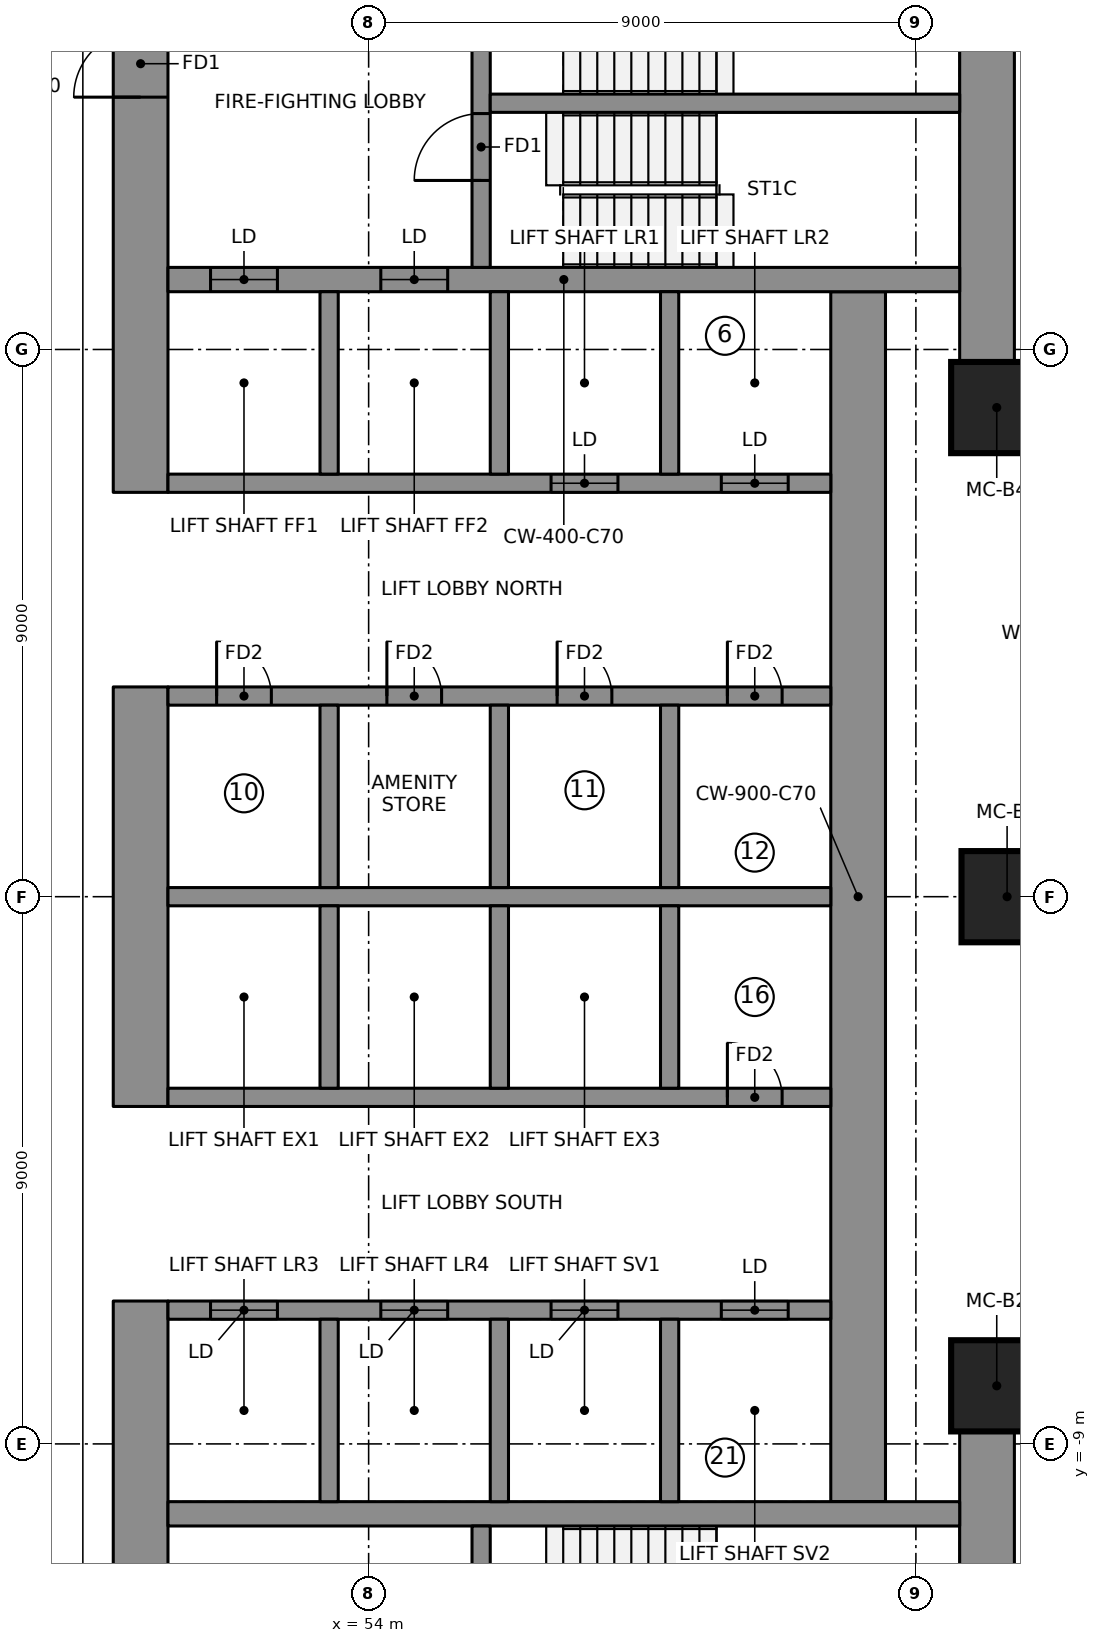
"""IFC4 building model, lengths in metres.
Left out: names, types, materials, properties, quantities, classifications, styles, units other than length and angle.
Written with IfcOpenShell. Run it as: python <this file> out.ifc"""

import sys

from ifc_helpers import new_model, si_unit, direction, frame, frame_2d, origin, origin_2d, place, context, subcontext, project, spatial, rectangle, extrude, element, fill, save


model = new_model("IFC4")
c1 = context("Model", 3, precision=1e-05, world=origin(), true_north=direction((0.0, 1.0)))
c2 = subcontext(c1, "Body", "Model", "MODEL_VIEW")
j1 = project(units=[si_unit("LENGTHUNIT", "METRE"), si_unit("PLANEANGLEUNIT", "RADIAN")], contexts=[c1])
p1 = place(None, origin())
s1 = spatial("IfcSite", under=j1, at=p1, CompositionType="ELEMENT")
p2 = place(p1, origin())
s2 = spatial("IfcBuilding", under=s1, at=p2, CompositionType="ELEMENT")
p3 = place(p2, frame((0.0, 0.0, 158.6)))
s3 = spatial("IfcBuildingStorey", under=s2, at=p3, CompositionType="ELEMENT", Elevation=158.6)
p4 = place(p3, frame((50.25, 6.65, 0.0), z_axis=(0.0, 0.0, 1.0), x_axis=(0.0, 1.0, 0.0)))
e1 = element("IfcWall", 1, at=p4, inside=s3, PredefinedType="SHEAR", context=c2, shape_type="SweptSolid", body=[
    extrude(rectangle(XDim=10.0, YDim=0.9, at=frame_2d((5.0, 0.0))), origin(), (0.0, 0.0, 1.0), 3.55),
])
p5 = place(p4, frame((6.5, 0.0, 0.0)))
e2 = element("IfcOpeningElement", 2, at=p5, cuts=e1, PredefinedType="OPENING", context=c2, shape_type="SweptSolid", body=[
    extrude(rectangle(XDim=1.1, YDim=2.1, at=frame_2d((0.55, 1.05))), frame((0.0, 0.46, 0.0), z_axis=(0.0, -1.0, 0.0), x_axis=(1.0, 0.0, 0.0)), (0.0, 0.0, 1.0), 0.92),
])
p6 = place(p3, frame((50.25, -3.45, 0.0), z_axis=(0.0, 0.0, 1.0), x_axis=(0.0, 1.0, 0.0)))
e3 = element("IfcWall", 3, at=p6, inside=s3, PredefinedType="SHEAR", context=c2, shape_type="SweptSolid", body=[
    extrude(rectangle(XDim=6.9, YDim=0.9, at=frame_2d((3.45, 0.0))), origin(), (0.0, 0.0, 1.0), 3.55),
])
p7 = place(p3, frame((50.25, -16.65, 0.0), z_axis=(0.0, 0.0, 1.0), x_axis=(0.0, 1.0, 0.0)))
e4 = element("IfcWall", 4, at=p7, inside=s3, PredefinedType="SHEAR", context=c2, shape_type="SweptSolid", body=[
    extrude(rectangle(XDim=10.0, YDim=0.9, at=frame_2d((5.0, 0.0))), origin(), (0.0, 0.0, 1.0), 3.55),
])
p8 = place(p7, frame((2.4, 0.0, 0.0)))
e5 = element("IfcOpeningElement", 5, at=p8, cuts=e4, PredefinedType="OPENING", context=c2, shape_type="SweptSolid", body=[
    extrude(rectangle(XDim=1.1, YDim=2.1, at=frame_2d((0.55, 1.05))), frame((0.0, 0.46, 0.0), z_axis=(0.0, -1.0, 0.0), x_axis=(1.0, 0.0, 0.0)), (0.0, 0.0, 1.0), 0.92),
])
for number, where, z_axis, x_axis in (
    (6, (64.17, 8.745, 0.0), (0.0, 0.0, 1.0), (0.0, 1.0, 0.0)),
    (7, (64.17, -15.75, 0.0), (0.0, 0.0, 1.0), (0.0, 1.0, 0.0)),
):
    element("IfcWall", number, at=place(p3, frame(where, z_axis=z_axis, x_axis=x_axis)), inside=s3, PredefinedType="SHEAR", context=c2, shape_type="SweptSolid", body=[
        extrude(rectangle(XDim=7.005, YDim=0.9, at=frame_2d((3.503, 0.0))), origin(), (0.0, 0.0, 1.0), 3.55),
    ])
p9 = place(p3, frame((62.05, -9.95, 0.0), z_axis=(0.0, 0.0, 1.0), x_axis=(0.0, 1.0, 0.0)))
e8 = element("IfcWall", 8, at=p9, inside=s3, PredefinedType="SHEAR", context=c2, shape_type="SweptSolid", body=[
    extrude(rectangle(XDim=19.9, YDim=0.9, at=frame_2d((9.95, 0.0))), origin(), (0.0, 0.0, 1.0), 3.55),
])
p10 = place(p3, frame((50.7, 10.15, 0.0), z_axis=(0.0, 0.0, 1.0), x_axis=(1.0, 0.0, 0.0)))
e9 = element("IfcWall", 9, at=p10, inside=s3, PredefinedType="SHEAR", context=c2, shape_type="SweptSolid", body=[
    extrude(rectangle(XDim=13.02, YDim=0.4, at=frame_2d((6.51, 0.0))), origin(), (0.0, 0.0, 1.0), 3.55),
])
p11 = place(p10, frame((0.7, 0.0, 0.0)))
e10 = element("IfcOpeningElement", 10, at=p11, cuts=e9, PredefinedType="OPENING", context=c2, shape_type="SweptSolid", body=[
    extrude(rectangle(XDim=1.1, YDim=2.1, at=frame_2d((0.55, 1.05))), frame((0.0, 0.21, 0.0), z_axis=(0.0, -1.0, 0.0), x_axis=(1.0, 0.0, 0.0)), (0.0, 0.0, 1.0), 0.42),
])
p12 = place(p10, frame((3.5, 0.0, 0.0)))
e11 = element("IfcOpeningElement", 11, at=p12, cuts=e9, PredefinedType="OPENING", context=c2, shape_type="SweptSolid", body=[
    extrude(rectangle(XDim=1.1, YDim=2.1, at=frame_2d((0.55, 1.05))), frame((0.0, 0.21, 0.0), z_axis=(0.0, -1.0, 0.0), x_axis=(1.0, 0.0, 0.0)), (0.0, 0.0, 1.0), 0.42),
])
p13 = place(p3, frame((50.7, -10.15, 0.0), z_axis=(0.0, 0.0, 1.0), x_axis=(1.0, 0.0, 0.0)))
e12 = element("IfcWall", 12, at=p13, inside=s3, PredefinedType="SHEAR", context=c2, shape_type="SweptSolid", body=[
    extrude(rectangle(XDim=13.02, YDim=0.4, at=frame_2d((6.51, 0.0))), origin(), (0.0, 0.0, 1.0), 3.55),
])
p14 = place(p3, frame((50.7, 0.0, 0.0), z_axis=(0.0, 0.0, 1.0), x_axis=(1.0, 0.0, 0.0)))
e13 = element("IfcWall", 13, at=p14, inside=s3, PredefinedType="SHEAR", context=c2, shape_type="SweptSolid", body=[
    extrude(rectangle(XDim=10.9, YDim=0.3, at=frame_2d((5.45, 0.0))), origin(), (0.0, 0.0, 1.0), 3.55),
])
p15 = place(p3, frame((50.7, 3.3, 0.0), z_axis=(0.0, 0.0, 1.0), x_axis=(1.0, 0.0, 0.0)))
e14 = element("IfcWall", 14, at=p15, inside=s3, PredefinedType="SHEAR", context=c2, shape_type="SweptSolid", body=[
    extrude(rectangle(XDim=10.9, YDim=0.3, at=frame_2d((5.45, 0.0))), origin(), (0.0, 0.0, 1.0), 3.55),
])
p16 = place(p15, frame((0.8, 0.0, 0.0)))
e15 = element("IfcOpeningElement", 15, at=p16, cuts=e14, PredefinedType="OPENING", context=c2, shape_type="SweptSolid", body=[
    extrude(rectangle(XDim=0.9, YDim=2.1, at=frame_2d((0.45, 1.05))), frame((0.0, 0.16, 0.0), z_axis=(0.0, -1.0, 0.0), x_axis=(1.0, 0.0, 0.0)), (0.0, 0.0, 1.0), 0.32),
])
p17 = place(p15, frame((3.6, 0.0, 0.0)))
e16 = element("IfcOpeningElement", 16, at=p17, cuts=e14, PredefinedType="OPENING", context=c2, shape_type="SweptSolid", body=[
    extrude(rectangle(XDim=0.9, YDim=2.1, at=frame_2d((0.45, 1.05))), frame((0.0, 0.16, 0.0), z_axis=(0.0, -1.0, 0.0), x_axis=(1.0, 0.0, 0.0)), (0.0, 0.0, 1.0), 0.32),
])
p18 = place(p15, frame((6.4, 0.0, 0.0)))
e17 = element("IfcOpeningElement", 17, at=p18, cuts=e14, PredefinedType="OPENING", context=c2, shape_type="SweptSolid", body=[
    extrude(rectangle(XDim=0.9, YDim=2.1, at=frame_2d((0.45, 1.05))), frame((0.0, 0.16, 0.0), z_axis=(0.0, -1.0, 0.0), x_axis=(1.0, 0.0, 0.0)), (0.0, 0.0, 1.0), 0.32),
])
p19 = place(p15, frame((9.2, 0.0, 0.0)))
e18 = element("IfcOpeningElement", 18, at=p19, cuts=e14, PredefinedType="OPENING", context=c2, shape_type="SweptSolid", body=[
    extrude(rectangle(XDim=0.9, YDim=2.1, at=frame_2d((0.45, 1.05))), frame((0.0, 0.16, 0.0), z_axis=(0.0, -1.0, 0.0), x_axis=(1.0, 0.0, 0.0)), (0.0, 0.0, 1.0), 0.32),
])
p20 = place(p3, frame((50.7, 6.8, 0.0), z_axis=(0.0, 0.0, 1.0), x_axis=(1.0, 0.0, 0.0)))
e19 = element("IfcWall", 19, at=p20, inside=s3, PredefinedType="SHEAR", context=c2, shape_type="SweptSolid", body=[
    extrude(rectangle(XDim=10.9, YDim=0.3, at=frame_2d((5.45, 0.0))), origin(), (0.0, 0.0, 1.0), 3.55),
])
p21 = place(p20, frame((6.3, 0.0, 0.0)))
e20 = element("IfcOpeningElement", 20, at=p21, cuts=e19, PredefinedType="OPENING", context=c2, shape_type="SweptSolid", body=[
    extrude(rectangle(XDim=1.1, YDim=2.1, at=frame_2d((0.55, 1.05))), frame((0.0, 0.16, 0.0), z_axis=(0.0, -1.0, 0.0), x_axis=(1.0, 0.0, 0.0)), (0.0, 0.0, 1.0), 0.32),
])
p22 = place(p20, frame((9.1, 0.0, 0.0)))
e21 = element("IfcOpeningElement", 21, at=p22, cuts=e19, PredefinedType="OPENING", context=c2, shape_type="SweptSolid", body=[
    extrude(rectangle(XDim=1.1, YDim=2.1, at=frame_2d((0.55, 1.05))), frame((0.0, 0.16, 0.0), z_axis=(0.0, -1.0, 0.0), x_axis=(1.0, 0.0, 0.0)), (0.0, 0.0, 1.0), 0.32),
])
for number, where, z_axis, x_axis in (
    (22, (53.35, 0.15, 0.0), (0.0, 0.0, 1.0), (0.0, 1.0, 0.0)),
    (23, (53.35, 6.95, 0.0), (0.0, 0.0, 1.0), (0.0, 1.0, 0.0)),
    (24, (56.15, 0.15, 0.0), (0.0, 0.0, 1.0), (0.0, 1.0, 0.0)),
    (25, (56.15, 6.95, 0.0), (0.0, 0.0, 1.0), (0.0, 1.0, 0.0)),
    (26, (58.95, 0.15, 0.0), (0.0, 0.0, 1.0), (0.0, 1.0, 0.0)),
    (27, (58.95, 6.95, 0.0), (0.0, 0.0, 1.0), (0.0, 1.0, 0.0)),
):
    element("IfcWall", number, at=place(p3, frame(where, z_axis=z_axis, x_axis=x_axis)), inside=s3, PredefinedType="SHEAR", context=c2, shape_type="SweptSolid", body=[
        extrude(rectangle(XDim=3.0, YDim=0.3, at=frame_2d((1.5, 0.0))), origin(), (0.0, 0.0, 1.0), 3.55),
    ])
p23 = place(p3, frame((50.7, -3.3, 0.0), z_axis=(0.0, 0.0, 1.0), x_axis=(1.0, 0.0, 0.0)))
e28 = element("IfcWall", 28, at=p23, inside=s3, PredefinedType="SHEAR", context=c2, shape_type="SweptSolid", body=[
    extrude(rectangle(XDim=10.9, YDim=0.3, at=frame_2d((5.45, 0.0))), origin(), (0.0, 0.0, 1.0), 3.55),
])
p24 = place(p23, frame((9.2, 0.0, 0.0)))
e29 = element("IfcOpeningElement", 29, at=p24, cuts=e28, PredefinedType="OPENING", context=c2, shape_type="SweptSolid", body=[
    extrude(rectangle(XDim=0.9, YDim=2.1, at=frame_2d((0.45, 1.05))), frame((0.0, 0.16, 0.0), z_axis=(0.0, -1.0, 0.0), x_axis=(1.0, 0.0, 0.0)), (0.0, 0.0, 1.0), 0.32),
])
p25 = place(p3, frame((50.7, -6.8, 0.0), z_axis=(0.0, 0.0, 1.0), x_axis=(1.0, 0.0, 0.0)))
e30 = element("IfcWall", 30, at=p25, inside=s3, PredefinedType="SHEAR", context=c2, shape_type="SweptSolid", body=[
    extrude(rectangle(XDim=10.9, YDim=0.3, at=frame_2d((5.45, 0.0))), origin(), (0.0, 0.0, 1.0), 3.55),
])
p26 = place(p25, frame((0.7, 0.0, 0.0)))
e31 = element("IfcOpeningElement", 31, at=p26, cuts=e30, PredefinedType="OPENING", context=c2, shape_type="SweptSolid", body=[
    extrude(rectangle(XDim=1.1, YDim=2.1, at=frame_2d((0.55, 1.05))), frame((0.0, 0.16, 0.0), z_axis=(0.0, -1.0, 0.0), x_axis=(1.0, 0.0, 0.0)), (0.0, 0.0, 1.0), 0.32),
])
p27 = place(p25, frame((3.5, 0.0, 0.0)))
e32 = element("IfcOpeningElement", 32, at=p27, cuts=e30, PredefinedType="OPENING", context=c2, shape_type="SweptSolid", body=[
    extrude(rectangle(XDim=1.1, YDim=2.1, at=frame_2d((0.55, 1.05))), frame((0.0, 0.16, 0.0), z_axis=(0.0, -1.0, 0.0), x_axis=(1.0, 0.0, 0.0)), (0.0, 0.0, 1.0), 0.32),
])
p28 = place(p25, frame((6.3, 0.0, 0.0)))
e33 = element("IfcOpeningElement", 33, at=p28, cuts=e30, PredefinedType="OPENING", context=c2, shape_type="SweptSolid", body=[
    extrude(rectangle(XDim=1.1, YDim=2.1, at=frame_2d((0.55, 1.05))), frame((0.0, 0.16, 0.0), z_axis=(0.0, -1.0, 0.0), x_axis=(1.0, 0.0, 0.0)), (0.0, 0.0, 1.0), 0.32),
])
p29 = place(p25, frame((9.1, 0.0, 0.0)))
e34 = element("IfcOpeningElement", 34, at=p29, cuts=e30, PredefinedType="OPENING", context=c2, shape_type="SweptSolid", body=[
    extrude(rectangle(XDim=1.1, YDim=2.1, at=frame_2d((0.55, 1.05))), frame((0.0, 0.16, 0.0), z_axis=(0.0, -1.0, 0.0), x_axis=(1.0, 0.0, 0.0)), (0.0, 0.0, 1.0), 0.32),
])
for number, where, z_axis, x_axis in (
    (35, (53.35, -3.15, 0.0), (0.0, 0.0, 1.0), (0.0, 1.0, 0.0)),
    (36, (53.35, -9.95, 0.0), (0.0, 0.0, 1.0), (0.0, 1.0, 0.0)),
    (37, (56.15, -3.15, 0.0), (0.0, 0.0, 1.0), (0.0, 1.0, 0.0)),
    (38, (56.15, -9.95, 0.0), (0.0, 0.0, 1.0), (0.0, 1.0, 0.0)),
    (39, (58.95, -3.15, 0.0), (0.0, 0.0, 1.0), (0.0, 1.0, 0.0)),
    (40, (58.95, -9.95, 0.0), (0.0, 0.0, 1.0), (0.0, 1.0, 0.0)),
):
    element("IfcWall", number, at=place(p3, frame(where, z_axis=z_axis, x_axis=x_axis)), inside=s3, PredefinedType="SHEAR", context=c2, shape_type="SweptSolid", body=[
        extrude(rectangle(XDim=3.0, YDim=0.3, at=frame_2d((1.5, 0.0))), origin(), (0.0, 0.0, 1.0), 3.55),
    ])
p30 = place(p3, frame((55.85, 10.35, 0.0), z_axis=(0.0, 0.0, 1.0), x_axis=(0.0, 1.0, 0.0)))
e41 = element("IfcWall", 41, at=p30, inside=s3, PredefinedType="SHEAR", context=c2, shape_type="SweptSolid", body=[
    extrude(rectangle(XDim=5.4, YDim=0.3, at=frame_2d((2.7, 0.0))), origin(), (0.0, 0.0, 1.0), 3.55),
])
p31 = place(p30, frame((1.43, 0.0, 0.0)))
e42 = element("IfcOpeningElement", 42, at=p31, cuts=e41, PredefinedType="OPENING", context=c2, shape_type="SweptSolid", body=[
    extrude(rectangle(XDim=1.1, YDim=2.1, at=frame_2d((0.55, 1.05))), frame((0.0, 0.16, 0.0), z_axis=(0.0, -1.0, 0.0), x_axis=(1.0, 0.0, 0.0)), (0.0, 0.0, 1.0), 0.32),
])
p32 = place(p30, frame((3.6, 0.0, 0.0)))
e43 = element("IfcOpeningElement", 43, at=p32, cuts=e41, PredefinedType="OPENING", context=c2, shape_type="SweptSolid", body=[
    extrude(rectangle(XDim=1.1, YDim=2.1, at=frame_2d((0.55, 1.05))), frame((0.0, 0.16, 0.0), z_axis=(0.0, -1.0, 0.0), x_axis=(1.0, 0.0, 0.0)), (0.0, 0.0, 1.0), 0.32),
])
p33 = place(p3, frame((55.85, -15.75, 0.0), z_axis=(0.0, 0.0, 1.0), x_axis=(0.0, 1.0, 0.0)))
e44 = element("IfcWall", 44, at=p33, inside=s3, PredefinedType="SHEAR", context=c2, shape_type="SweptSolid", body=[
    extrude(rectangle(XDim=5.4, YDim=0.3, at=frame_2d((2.7, 0.0))), origin(), (0.0, 0.0, 1.0), 3.55),
])
p34 = place(p33, frame((3.6, 0.0, 0.0)))
e45 = element("IfcOpeningElement", 45, at=p34, cuts=e44, PredefinedType="OPENING", context=c2, shape_type="SweptSolid", body=[
    extrude(rectangle(XDim=1.1, YDim=2.1, at=frame_2d((0.55, 1.05))), frame((0.0, 0.16, 0.0), z_axis=(0.0, -1.0, 0.0), x_axis=(1.0, 0.0, 0.0)), (0.0, 0.0, 1.0), 0.32),
])
p35 = place(p33, frame((0.8, 0.0, 0.0)))
e46 = element("IfcOpeningElement", 46, at=p35, cuts=e44, PredefinedType="OPENING", context=c2, shape_type="SweptSolid", body=[
    extrude(rectangle(XDim=0.9, YDim=2.1, at=frame_2d((0.45, 1.05))), frame((0.0, 0.16, 0.0), z_axis=(0.0, -1.0, 0.0), x_axis=(1.0, 0.0, 0.0)), (0.0, 0.0, 1.0), 0.32),
])
p36 = place(p3, frame((56.0, 13.05, 0.0), z_axis=(0.0, 0.0, 1.0), x_axis=(1.0, 0.0, 0.0)))
e47 = element("IfcWall", 47, at=p36, inside=s3, PredefinedType="SHEAR", context=c2, shape_type="SweptSolid", body=[
    extrude(rectangle(XDim=7.72, YDim=0.3, at=frame_2d((3.86, 0.0))), origin(), (0.0, 0.0, 1.0), 3.55),
])
for number, where, z_axis, x_axis in (
    (48, (64.33, -8.045, 0.0), (0.0, 0.0, 1.0), (1.0, 0.0, 0.0)),
    (49, (64.5, 0.0, 0.0), (0.0, 0.0, 1.0), (1.0, 0.0, 0.0)),
    (50, (64.33, 8.045, 0.0), (0.0, 0.0, 1.0), (1.0, 0.0, 0.0)),
):
    element("IfcColumn", number, at=place(p3, frame(where, z_axis=z_axis, x_axis=x_axis)), inside=s3, PredefinedType="COLUMN", context=c2, shape_type="SweptSolid", body=[
        extrude(rectangle(XDim=1.5, YDim=1.5, at=origin_2d()), origin(), (0.0, 0.0, 1.0), 3.55),
    ])
p37 = place(p11, origin())
e51 = element("IfcDoor", 51, at=p37, inside=s3, OperationType="DOUBLE_DOOR_SLIDING", PredefinedType="DOOR", context=c2, shape_type="SweptSolid", body=[
    extrude(rectangle(XDim=1.1, YDim=2.1, at=frame_2d((0.55, 1.05))), frame((0.0, 0.025, 0.0), z_axis=(0.0, -1.0, 0.0), x_axis=(1.0, 0.0, 0.0)), (0.0, 0.0, 1.0), 0.05),
])
fill(e10, e51)
p38 = place(p12, origin())
e52 = element("IfcDoor", 52, at=p38, inside=s3, OperationType="DOUBLE_DOOR_SLIDING", PredefinedType="DOOR", context=c2, shape_type="SweptSolid", body=[
    extrude(rectangle(XDim=1.1, YDim=2.1, at=frame_2d((0.55, 1.05))), frame((0.0, 0.025, 0.0), z_axis=(0.0, -1.0, 0.0), x_axis=(1.0, 0.0, 0.0)), (0.0, 0.0, 1.0), 0.05),
])
fill(e11, e52)
p39 = place(p21, origin())
e53 = element("IfcDoor", 53, at=p39, inside=s3, OperationType="DOUBLE_DOOR_SLIDING", PredefinedType="DOOR", context=c2, shape_type="SweptSolid", body=[
    extrude(rectangle(XDim=1.1, YDim=2.1, at=frame_2d((0.55, 1.05))), frame((0.0, 0.025, 0.0), z_axis=(0.0, -1.0, 0.0), x_axis=(1.0, 0.0, 0.0)), (0.0, 0.0, 1.0), 0.05),
])
fill(e20, e53)
p40 = place(p22, origin())
e54 = element("IfcDoor", 54, at=p40, inside=s3, OperationType="DOUBLE_DOOR_SLIDING", PredefinedType="DOOR", context=c2, shape_type="SweptSolid", body=[
    extrude(rectangle(XDim=1.1, YDim=2.1, at=frame_2d((0.55, 1.05))), frame((0.0, 0.025, 0.0), z_axis=(0.0, -1.0, 0.0), x_axis=(1.0, 0.0, 0.0)), (0.0, 0.0, 1.0), 0.05),
])
fill(e21, e54)
p41 = place(p26, origin())
e55 = element("IfcDoor", 55, at=p41, inside=s3, OperationType="DOUBLE_DOOR_SLIDING", PredefinedType="DOOR", context=c2, shape_type="SweptSolid", body=[
    extrude(rectangle(XDim=1.1, YDim=2.1, at=frame_2d((0.55, 1.05))), frame((0.0, 0.025, 0.0), z_axis=(0.0, -1.0, 0.0), x_axis=(1.0, 0.0, 0.0)), (0.0, 0.0, 1.0), 0.05),
])
fill(e31, e55)
p42 = place(p27, origin())
e56 = element("IfcDoor", 56, at=p42, inside=s3, OperationType="DOUBLE_DOOR_SLIDING", PredefinedType="DOOR", context=c2, shape_type="SweptSolid", body=[
    extrude(rectangle(XDim=1.1, YDim=2.1, at=frame_2d((0.55, 1.05))), frame((0.0, 0.025, 0.0), z_axis=(0.0, -1.0, 0.0), x_axis=(1.0, 0.0, 0.0)), (0.0, 0.0, 1.0), 0.05),
])
fill(e32, e56)
p43 = place(p28, origin())
e57 = element("IfcDoor", 57, at=p43, inside=s3, OperationType="DOUBLE_DOOR_SLIDING", PredefinedType="DOOR", context=c2, shape_type="SweptSolid", body=[
    extrude(rectangle(XDim=1.1, YDim=2.1, at=frame_2d((0.55, 1.05))), frame((0.0, 0.025, 0.0), z_axis=(0.0, -1.0, 0.0), x_axis=(1.0, 0.0, 0.0)), (0.0, 0.0, 1.0), 0.05),
])
fill(e33, e57)
p44 = place(p29, origin())
e58 = element("IfcDoor", 58, at=p44, inside=s3, OperationType="DOUBLE_DOOR_SLIDING", PredefinedType="DOOR", context=c2, shape_type="SweptSolid", body=[
    extrude(rectangle(XDim=1.1, YDim=2.1, at=frame_2d((0.55, 1.05))), frame((0.0, 0.025, 0.0), z_axis=(0.0, -1.0, 0.0), x_axis=(1.0, 0.0, 0.0)), (0.0, 0.0, 1.0), 0.05),
])
fill(e34, e58)
p45 = place(p31, origin())
e59 = element("IfcDoor", 59, at=p45, inside=s3, OperationType="SINGLE_SWING_RIGHT", PredefinedType="DOOR", context=c2, shape_type="SweptSolid", body=[
    extrude(rectangle(XDim=1.1, YDim=2.1, at=frame_2d((0.55, 1.05))), frame((0.0, 0.025, 0.0), z_axis=(0.0, -1.0, 0.0), x_axis=(1.0, 0.0, 0.0)), (0.0, 0.0, 1.0), 0.05),
])
fill(e42, e59)
p46 = place(p5, origin())
e60 = element("IfcDoor", 60, at=p46, inside=s3, OperationType="SINGLE_SWING_RIGHT", PredefinedType="DOOR", context=c2, shape_type="SweptSolid", body=[
    extrude(rectangle(XDim=1.1, YDim=2.1, at=frame_2d((0.55, 1.05))), frame((0.0, 0.025, 0.0), z_axis=(0.0, -1.0, 0.0), x_axis=(1.0, 0.0, 0.0)), (0.0, 0.0, 1.0), 0.05),
])
fill(e2, e60)
p47 = place(p16, origin())
e61 = element("IfcDoor", 61, at=p47, inside=s3, OperationType="SINGLE_SWING_LEFT", PredefinedType="DOOR", context=c2, shape_type="SweptSolid", body=[
    extrude(rectangle(XDim=0.9, YDim=2.1, at=frame_2d((0.45, 1.05))), frame((0.0, 0.025, 0.0), z_axis=(0.0, -1.0, 0.0), x_axis=(1.0, 0.0, 0.0)), (0.0, 0.0, 1.0), 0.05),
])
fill(e15, e61)
p48 = place(p17, origin())
e62 = element("IfcDoor", 62, at=p48, inside=s3, OperationType="SINGLE_SWING_LEFT", PredefinedType="DOOR", context=c2, shape_type="SweptSolid", body=[
    extrude(rectangle(XDim=0.9, YDim=2.1, at=frame_2d((0.45, 1.05))), frame((0.0, 0.025, 0.0), z_axis=(0.0, -1.0, 0.0), x_axis=(1.0, 0.0, 0.0)), (0.0, 0.0, 1.0), 0.05),
])
fill(e16, e62)
p49 = place(p18, origin())
e63 = element("IfcDoor", 63, at=p49, inside=s3, OperationType="SINGLE_SWING_LEFT", PredefinedType="DOOR", context=c2, shape_type="SweptSolid", body=[
    extrude(rectangle(XDim=0.9, YDim=2.1, at=frame_2d((0.45, 1.05))), frame((0.0, 0.025, 0.0), z_axis=(0.0, -1.0, 0.0), x_axis=(1.0, 0.0, 0.0)), (0.0, 0.0, 1.0), 0.05),
])
fill(e17, e63)
p50 = place(p19, origin())
e64 = element("IfcDoor", 64, at=p50, inside=s3, OperationType="SINGLE_SWING_LEFT", PredefinedType="DOOR", context=c2, shape_type="SweptSolid", body=[
    extrude(rectangle(XDim=0.9, YDim=2.1, at=frame_2d((0.45, 1.05))), frame((0.0, 0.025, 0.0), z_axis=(0.0, -1.0, 0.0), x_axis=(1.0, 0.0, 0.0)), (0.0, 0.0, 1.0), 0.05),
])
fill(e18, e64)
p51 = place(p24, origin())
e65 = element("IfcDoor", 65, at=p51, inside=s3, OperationType="SINGLE_SWING_LEFT", PredefinedType="DOOR", context=c2, shape_type="SweptSolid", body=[
    extrude(rectangle(XDim=0.9, YDim=2.1, at=frame_2d((0.45, 1.05))), frame((0.0, 0.025, 0.0), z_axis=(0.0, -1.0, 0.0), x_axis=(1.0, 0.0, 0.0)), (0.0, 0.0, 1.0), 0.05),
])
fill(e29, e65)
save(model, sys.argv[1])
